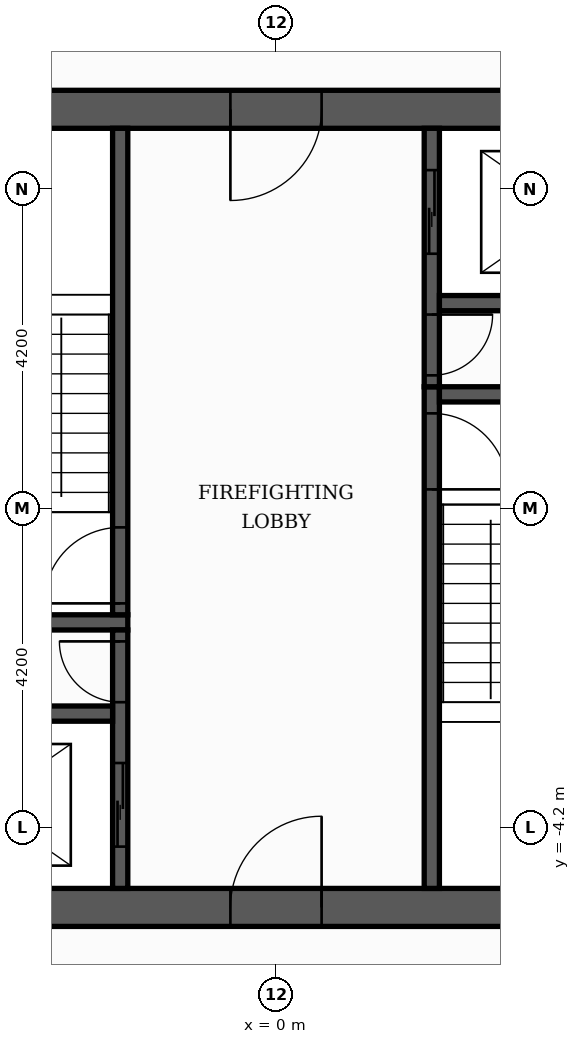
"""IFC4 building model, lengths in metres.
Left out: names, types, materials, properties, quantities, classifications, styles, units other than length and angle.
Written with IfcOpenShell. Run it as: python <this file> out.ifc"""

import sys

from ifc_helpers import new_model, si_unit, direction, frame, frame_2d, origin, place, context, subcontext, project, spatial, rectangle, extrude, element, fill, save


model = new_model("IFC4")
c1 = context("Model", 3, precision=1e-05, world=origin(), true_north=direction((0.0, 1.0)))
c2 = subcontext(c1, "Body", "Model", "MODEL_VIEW")
j1 = project(units=[si_unit("LENGTHUNIT", "METRE"), si_unit("PLANEANGLEUNIT", "RADIAN")], contexts=[c1])
p1 = place(None, origin())
s1 = spatial("IfcSite", under=j1, at=p1, CompositionType="ELEMENT")
p2 = place(p1, origin())
s2 = spatial("IfcBuilding", under=s1, at=p2, CompositionType="ELEMENT")
p3 = place(p2, frame((0.0, 0.0, 196.2)))
s3 = spatial("IfcBuildingStorey", under=s2, at=p3, CompositionType="ELEMENT", Elevation=196.2)
p4 = place(p3, frame((-5.5, -5.25, 0.0), z_axis=(0.0, 0.0, 1.0), x_axis=(1.0, 0.0, 0.0)))
e1 = element("IfcWall", 1, at=p4, inside=s3, PredefinedType="SHEAR", context=c2, shape_type="SweptSolid", body=[
    extrude(rectangle(XDim=11.0, YDim=0.5, at=frame_2d((5.5, 0.0))), origin(), (0.0, 0.0, 1.0), 3.48),
])
p5 = place(p4, frame((4.9, 0.0, 0.0)))
e2 = element("IfcOpeningElement", 2, at=p5, cuts=e1, PredefinedType="OPENING", context=c2, shape_type="SweptSolid", body=[
    extrude(rectangle(XDim=1.2, YDim=2.1, at=frame_2d((0.6, 1.05))), frame((0.0, 0.26, 0.0), z_axis=(0.0, -1.0, 0.0), x_axis=(1.0, 0.0, 0.0)), (0.0, 0.0, 1.0), 0.52),
])
p6 = place(p3, frame((-5.0, 5.25, 0.0), z_axis=(0.0, 0.0, 1.0), x_axis=(1.0, 0.0, 0.0)))
e3 = element("IfcWall", 3, at=p6, inside=s3, PredefinedType="SHEAR", context=c2, shape_type="SweptSolid", body=[
    extrude(rectangle(XDim=10.0, YDim=0.5, at=frame_2d((5.0, 0.0))), origin(), (0.0, 0.0, 1.0), 3.48),
])
p7 = place(p6, frame((4.4, 0.0, 0.0)))
e4 = element("IfcOpeningElement", 4, at=p7, cuts=e3, PredefinedType="OPENING", context=c2, shape_type="SweptSolid", body=[
    extrude(rectangle(XDim=1.2, YDim=2.1, at=frame_2d((0.6, 1.05))), frame((0.0, 0.26, 0.0), z_axis=(0.0, -1.0, 0.0), x_axis=(1.0, 0.0, 0.0)), (0.0, 0.0, 1.0), 0.52),
])
p8 = place(p3, frame((2.05, -5.0, 0.0), z_axis=(0.0, 0.0, 1.0), x_axis=(0.0, 1.0, 0.0)))
e5 = element("IfcWall", 5, at=p8, inside=s3, PredefinedType="SHEAR", context=c2, shape_type="SweptSolid", body=[
    extrude(rectangle(XDim=6.6, YDim=0.2, at=frame_2d((3.3, 0.0))), origin(), (0.0, 0.0, 1.0), 3.48),
])
p9 = place(p8, frame((5.25, 0.0, 0.0)))
e6 = element("IfcOpeningElement", 6, at=p9, cuts=e5, PredefinedType="OPENING", context=c2, shape_type="SweptSolid", body=[
    extrude(rectangle(XDim=1.0, YDim=2.1, at=frame_2d((0.5, 1.05))), frame((0.0, 0.11, 0.0), z_axis=(0.0, -1.0, 0.0), x_axis=(1.0, 0.0, 0.0)), (0.0, 0.0, 1.0), 0.22),
])
p10 = place(p3, frame((-5.0, -1.5, 0.0), z_axis=(0.0, 0.0, 1.0), x_axis=(1.0, 0.0, 0.0)))
e7 = element("IfcWall", 7, at=p10, inside=s3, PredefinedType="SHEAR", context=c2, shape_type="SweptSolid", body=[
    extrude(rectangle(XDim=3.05, YDim=0.2, at=frame_2d((1.525, 0.0))), origin(), (0.0, 0.0, 1.0), 3.48),
])
p11 = place(p3, frame((-2.05, -1.4, 0.0), z_axis=(0.0, 0.0, 1.0), x_axis=(0.0, 1.0, 0.0)))
e8 = element("IfcWall", 8, at=p11, inside=s3, PredefinedType="SHEAR", context=c2, shape_type="SweptSolid", body=[
    extrude(rectangle(XDim=6.4, YDim=0.2, at=frame_2d((3.2, 0.0))), origin(), (0.0, 0.0, 1.0), 3.48),
])
p12 = place(p11, frame((0.15, 0.0, 0.0)))
e9 = element("IfcOpeningElement", 9, at=p12, cuts=e8, PredefinedType="OPENING", context=c2, shape_type="SweptSolid", body=[
    extrude(rectangle(XDim=1.0, YDim=2.1, at=frame_2d((0.5, 1.05))), frame((0.0, 0.11, 0.0), z_axis=(0.0, -1.0, 0.0), x_axis=(1.0, 0.0, 0.0)), (0.0, 0.0, 1.0), 0.22),
])
p13 = place(p3, frame((2.15, 1.5, 0.0), z_axis=(0.0, 0.0, 1.0), x_axis=(1.0, 0.0, 0.0)))
e10 = element("IfcWall", 10, at=p13, inside=s3, PredefinedType="SHEAR", context=c2, shape_type="SweptSolid", body=[
    extrude(rectangle(XDim=2.85, YDim=0.2, at=frame_2d((1.425, 0.0))), origin(), (0.0, 0.0, 1.0), 3.48),
])
p14 = place(p3, frame((-2.05, -5.0, 0.0), z_axis=(0.0, 0.0, 1.0), x_axis=(0.0, 1.0, 0.0)))
e11 = element("IfcWall", 11, at=p14, inside=s3, PredefinedType="SHEAR", context=c2, shape_type="SweptSolid", body=[
    extrude(rectangle(XDim=3.4, YDim=0.2, at=frame_2d((1.7, 0.0))), origin(), (0.0, 0.0, 1.0), 3.48),
])
p15 = place(p14, frame((0.55, 0.0, 0.0)))
e12 = element("IfcOpeningElement", 12, at=p15, cuts=e11, PredefinedType="OPENING", context=c2, shape_type="SweptSolid", body=[
    extrude(rectangle(XDim=1.1, YDim=2.1, at=frame_2d((0.55, 1.05))), frame((0.0, 0.11, 0.0), z_axis=(0.0, -1.0, 0.0), x_axis=(1.0, 0.0, 0.0)), (0.0, 0.0, 1.0), 0.22),
])
p16 = place(p14, frame((2.45, 0.0, 0.0)))
e13 = element("IfcOpeningElement", 13, at=p16, cuts=e11, PredefinedType="OPENING", context=c2, shape_type="SweptSolid", body=[
    extrude(rectangle(XDim=0.8, YDim=2.1, at=frame_2d((0.4, 1.05))), frame((0.0, 0.11, 0.0), z_axis=(0.0, -1.0, 0.0), x_axis=(1.0, 0.0, 0.0)), (0.0, 0.0, 1.0), 0.22),
])
p17 = place(p3, frame((-5.0, -2.7, 0.0), z_axis=(0.0, 0.0, 1.0), x_axis=(1.0, 0.0, 0.0)))
e14 = element("IfcWall", 14, at=p17, inside=s3, PredefinedType="SHEAR", context=c2, shape_type="SweptSolid", body=[
    extrude(rectangle(XDim=2.85, YDim=0.2, at=frame_2d((1.425, 0.0))), origin(), (0.0, 0.0, 1.0), 3.48),
])
p18 = place(p3, frame((2.05, 1.6, 0.0), z_axis=(0.0, 0.0, 1.0), x_axis=(0.0, 1.0, 0.0)))
e15 = element("IfcWall", 15, at=p18, inside=s3, PredefinedType="SHEAR", context=c2, shape_type="SweptSolid", body=[
    extrude(rectangle(XDim=3.4, YDim=0.2, at=frame_2d((1.7, 0.0))), origin(), (0.0, 0.0, 1.0), 3.48),
])
p19 = place(p18, frame((1.75, 0.0, 0.0)))
e16 = element("IfcOpeningElement", 16, at=p19, cuts=e15, PredefinedType="OPENING", context=c2, shape_type="SweptSolid", body=[
    extrude(rectangle(XDim=1.1, YDim=2.1, at=frame_2d((0.55, 1.05))), frame((0.0, 0.11, 0.0), z_axis=(0.0, -1.0, 0.0), x_axis=(1.0, 0.0, 0.0)), (0.0, 0.0, 1.0), 0.22),
])
p20 = place(p18, frame((0.15, 0.0, 0.0)))
e17 = element("IfcOpeningElement", 17, at=p20, cuts=e15, PredefinedType="OPENING", context=c2, shape_type="SweptSolid", body=[
    extrude(rectangle(XDim=0.8, YDim=2.1, at=frame_2d((0.4, 1.05))), frame((0.0, 0.11, 0.0), z_axis=(0.0, -1.0, 0.0), x_axis=(1.0, 0.0, 0.0)), (0.0, 0.0, 1.0), 0.22),
])
p21 = place(p3, frame((2.15, 2.7, 0.0), z_axis=(0.0, 0.0, 1.0), x_axis=(1.0, 0.0, 0.0)))
e18 = element("IfcWall", 18, at=p21, inside=s3, PredefinedType="SHEAR", context=c2, shape_type="SweptSolid", body=[
    extrude(rectangle(XDim=2.85, YDim=0.2, at=frame_2d((1.425, 0.0))), origin(), (0.0, 0.0, 1.0), 3.48),
])
p22 = place(p19, origin())
e19 = element("IfcDoor", 19, at=p22, inside=s3, OperationType="SLIDING_TO_LEFT", PredefinedType="DOOR", context=c2, shape_type="SweptSolid", body=[
    extrude(rectangle(XDim=1.1, YDim=2.1, at=frame_2d((0.55, 1.05))), frame((0.0, 0.025, 0.0), z_axis=(0.0, -1.0, 0.0), x_axis=(1.0, 0.0, 0.0)), (0.0, 0.0, 1.0), 0.05),
])
fill(e16, e19)
p23 = place(p15, origin())
e20 = element("IfcDoor", 20, at=p23, inside=s3, OperationType="SLIDING_TO_LEFT", PredefinedType="DOOR", context=c2, shape_type="SweptSolid", body=[
    extrude(rectangle(XDim=1.1, YDim=2.1, at=frame_2d((0.55, 1.05))), frame((0.0, 0.025, 0.0), z_axis=(0.0, -1.0, 0.0), x_axis=(1.0, 0.0, 0.0)), (0.0, 0.0, 1.0), 0.05),
])
fill(e12, e20)
p24 = place(p12, origin())
e21 = element("IfcDoor", 21, at=p24, inside=s3, OperationType="SINGLE_SWING_LEFT", PredefinedType="DOOR", context=c2, shape_type="SweptSolid", body=[
    extrude(rectangle(XDim=1.0, YDim=2.1, at=frame_2d((0.5, 1.05))), frame((0.0, 0.025, 0.0), z_axis=(0.0, -1.0, 0.0), x_axis=(1.0, 0.0, 0.0)), (0.0, 0.0, 1.0), 0.05),
])
fill(e9, e21)
p25 = place(p9, frame((1.0, 0.0, 0.0), z_axis=(0.0, 0.0, 1.0), x_axis=(-1.0, 0.0, 0.0)))
e22 = element("IfcDoor", 22, at=p25, inside=s3, OperationType="SINGLE_SWING_LEFT", PredefinedType="DOOR", context=c2, shape_type="SweptSolid", body=[
    extrude(rectangle(XDim=1.0, YDim=2.1, at=frame_2d((0.5, 1.05))), frame((0.0, 0.025, 0.0), z_axis=(0.0, -1.0, 0.0), x_axis=(1.0, 0.0, 0.0)), (0.0, 0.0, 1.0), 0.05),
])
fill(e6, e22)
p26 = place(p20, frame((0.8, 0.0, 0.0), z_axis=(0.0, 0.0, 1.0), x_axis=(-1.0, 0.0, 0.0)))
e23 = element("IfcDoor", 23, at=p26, inside=s3, OperationType="SINGLE_SWING_RIGHT", PredefinedType="DOOR", context=c2, shape_type="SweptSolid", body=[
    extrude(rectangle(XDim=0.8, YDim=2.1, at=frame_2d((0.4, 1.05))), frame((0.0, 0.025, 0.0), z_axis=(0.0, -1.0, 0.0), x_axis=(1.0, 0.0, 0.0)), (0.0, 0.0, 1.0), 0.05),
])
fill(e17, e23)
p27 = place(p16, origin())
e24 = element("IfcDoor", 24, at=p27, inside=s3, OperationType="SINGLE_SWING_RIGHT", PredefinedType="DOOR", context=c2, shape_type="SweptSolid", body=[
    extrude(rectangle(XDim=0.8, YDim=2.1, at=frame_2d((0.4, 1.05))), frame((0.0, 0.025, 0.0), z_axis=(0.0, -1.0, 0.0), x_axis=(1.0, 0.0, 0.0)), (0.0, 0.0, 1.0), 0.05),
])
fill(e13, e24)
p28 = place(p7, frame((1.2, 0.0, 0.0), z_axis=(0.0, 0.0, 1.0), x_axis=(-1.0, 0.0, 0.0)))
e25 = element("IfcDoor", 25, at=p28, inside=s3, OperationType="SINGLE_SWING_LEFT", PredefinedType="DOOR", context=c2, shape_type="SweptSolid", body=[
    extrude(rectangle(XDim=1.2, YDim=2.1, at=frame_2d((0.6, 1.05))), frame((0.0, 0.025, 0.0), z_axis=(0.0, -1.0, 0.0), x_axis=(1.0, 0.0, 0.0)), (0.0, 0.0, 1.0), 0.05),
])
fill(e4, e25)
p29 = place(p5, origin())
e26 = element("IfcDoor", 26, at=p29, inside=s3, OperationType="SINGLE_SWING_RIGHT", PredefinedType="DOOR", context=c2, shape_type="SweptSolid", body=[
    extrude(rectangle(XDim=1.2, YDim=2.1, at=frame_2d((0.6, 1.05))), frame((0.0, 0.025, 0.0), z_axis=(0.0, -1.0, 0.0), x_axis=(1.0, 0.0, 0.0)), (0.0, 0.0, 1.0), 0.05),
])
fill(e2, e26)
save(model, sys.argv[1])
